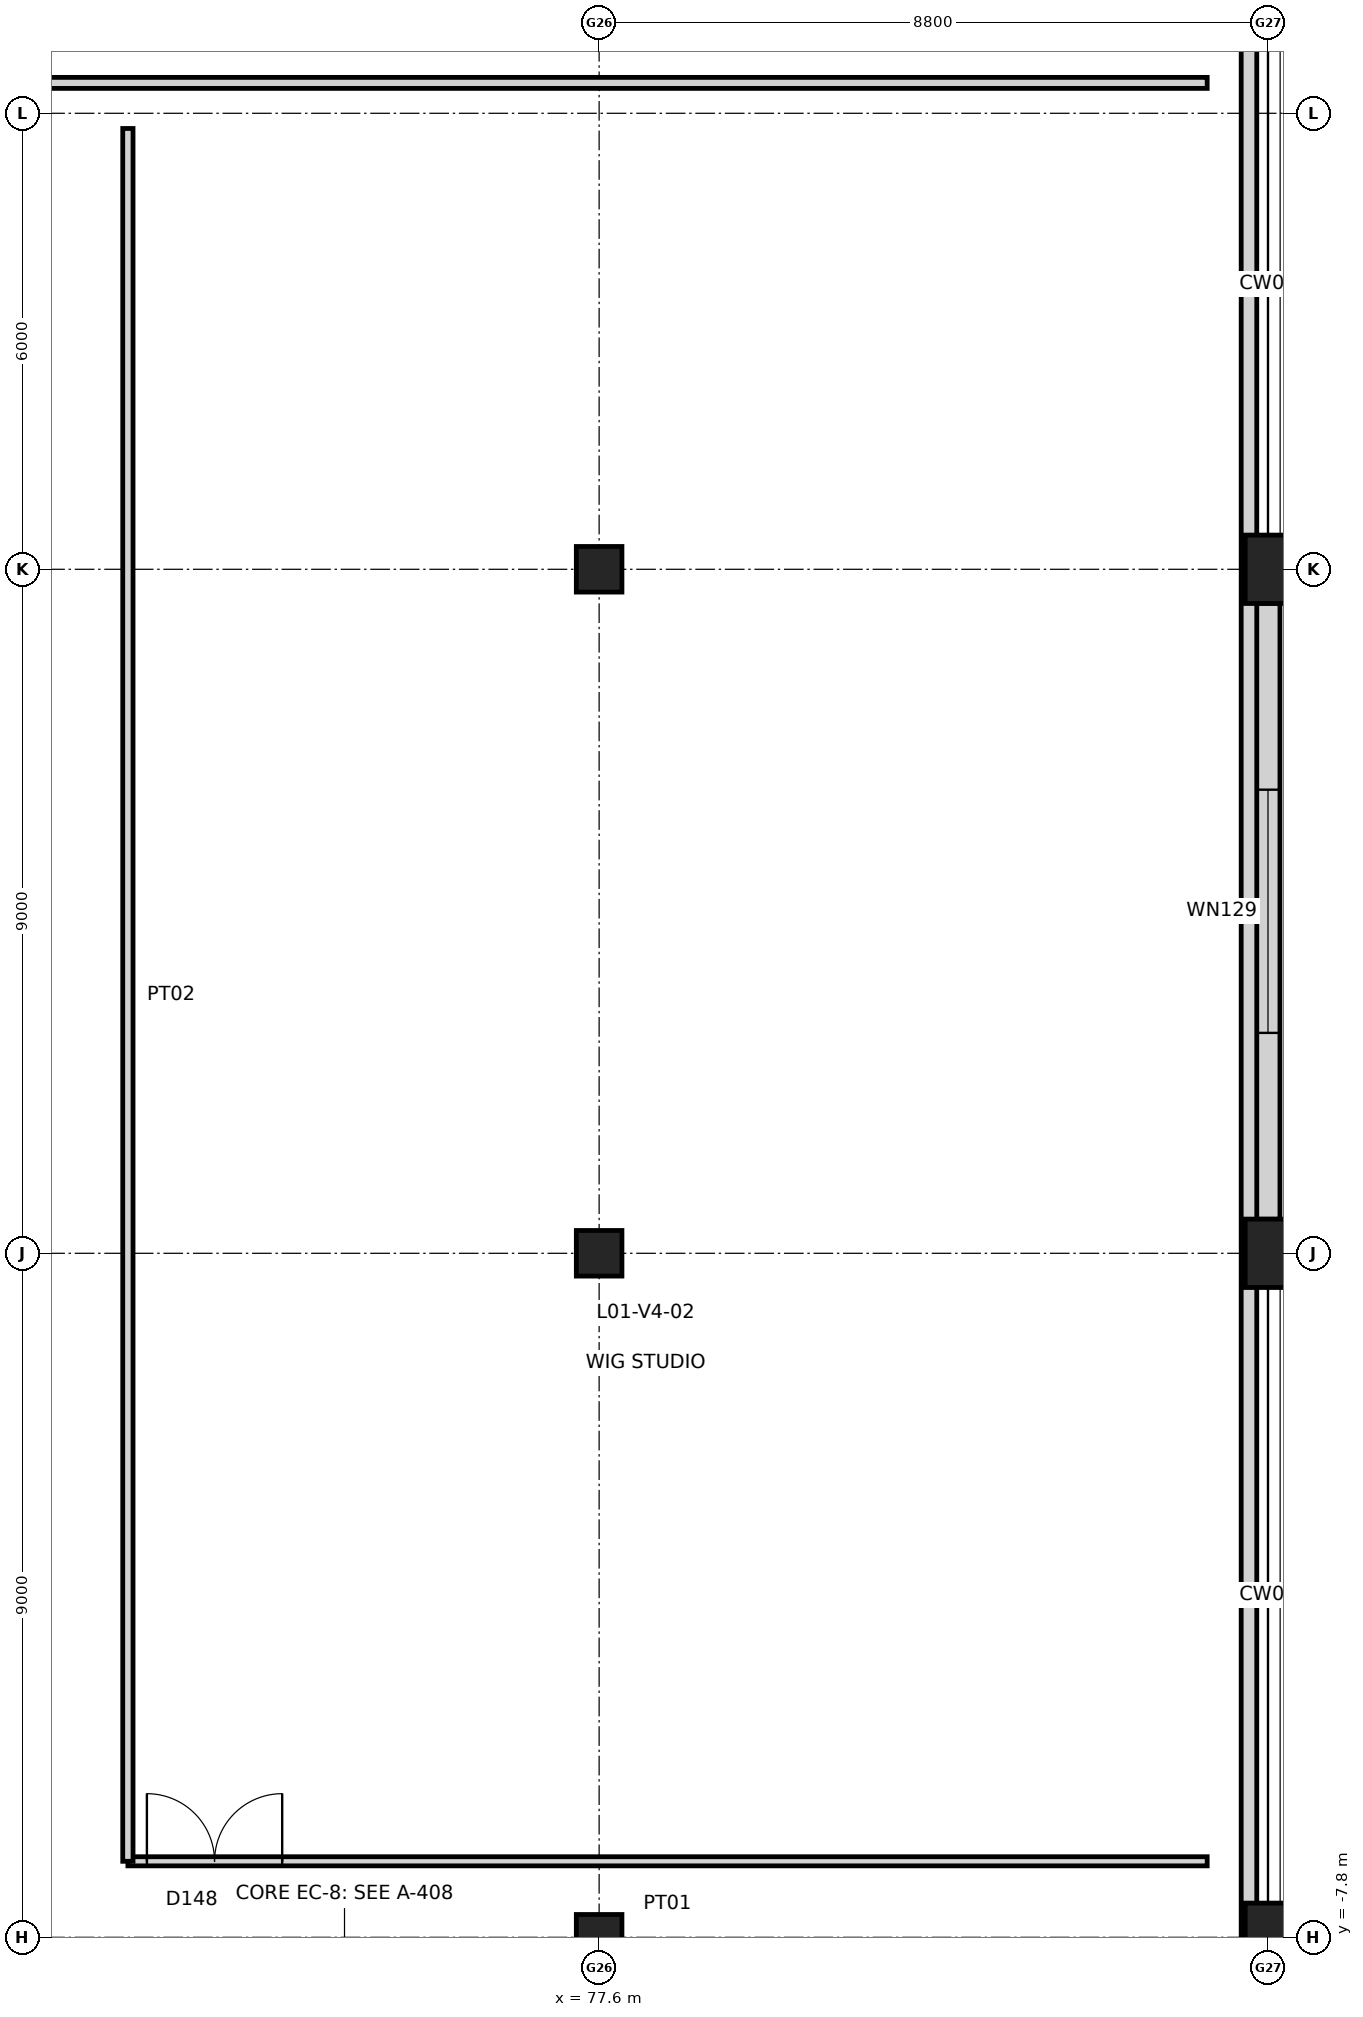
"""IFC4 building model, lengths in metres.
Left out: names, types, materials, properties, quantities, classifications, styles, units other than length and angle.
Written with IfcOpenShell. Run it as: python <this file> out.ifc"""

import sys

from ifc_helpers import new_model, si_unit, direction, frame, frame_2d, origin, origin_2d, place, context, subcontext, project, spatial, rectangle, extrude, element, fill, save


model = new_model("IFC4")
c1 = context("Model", 3, precision=1e-05, world=origin(), true_north=direction((0.0, 1.0)))
c2 = subcontext(c1, "Body", "Model", "MODEL_VIEW")
j1 = project(units=[si_unit("LENGTHUNIT", "METRE"), si_unit("PLANEANGLEUNIT", "RADIAN")], contexts=[c1])
p1 = place(None, origin())
s1 = spatial("IfcSite", under=j1, at=p1, CompositionType="ELEMENT")
p2 = place(p1, origin())
s2 = spatial("IfcBuilding", under=s1, at=p2, CompositionType="ELEMENT")
p3 = place(p2, frame((0.0, 0.0, 5.4)))
s3 = spatial("IfcBuildingStorey", under=s2, at=p3, CompositionType="ELEMENT", Elevation=5.4)
for number, where, z_axis, x_axis in (
    (1, (77.6, -7.8, 0.0), (0.0, 0.0, 1.0), (1.0, 0.0, 0.0)),
    (2, (77.6, 1.2, 0.0), (0.0, 0.0, 1.0), (1.0, 0.0, 0.0)),
    (3, (77.6, 10.2, 0.0), (0.0, 0.0, 1.0), (1.0, 0.0, 0.0)),
):
    element("IfcColumn", number, at=place(p3, frame(where, z_axis=z_axis, x_axis=x_axis)), inside=s3, PredefinedType="COLUMN", context=c2, shape_type="SweptSolid", body=[
        extrude(rectangle(XDim=0.6, YDim=0.6, at=origin_2d()), origin(), (0.0, 0.0, 1.0), 4.8),
    ])
for number, where, z_axis, x_axis in (
    (4, (86.4, -7.8, 0.0), (0.0, 0.0, 1.0), (1.0, 0.0, 0.0)),
    (5, (86.4, 1.2, 0.0), (0.0, 0.0, 1.0), (1.0, 0.0, 0.0)),
    (6, (86.4, 10.2, 0.0), (0.0, 0.0, 1.0), (1.0, 0.0, 0.0)),
):
    element("IfcColumn", number, at=place(p3, frame(where, z_axis=z_axis, x_axis=x_axis)), inside=s3, PredefinedType="COLUMN", context=c2, shape_type="SweptSolid", body=[
        extrude(rectangle(XDim=0.6, YDim=0.9, at=origin_2d()), origin(), (0.0, 0.0, 1.0), 4.8),
    ])
p4 = place(p3, frame((86.4, 9.752, 0.0), z_axis=(0.0, 0.0, 1.0), x_axis=(0.0, -1.0, 0.0)))
e7 = element("IfcWall", 7, at=p4, inside=s3, PredefinedType="STANDARD", context=c2, shape_type="SweptSolid", body=[
    extrude(rectangle(XDim=8.104, YDim=0.315, at=frame_2d((4.052, 0.0))), origin(), (0.0, 0.0, 1.0), 3.829),
])
p5 = place(p4, frame((2.452, 0.0, 0.85)))
e8 = element("IfcOpeningElement", 8, at=p5, cuts=e7, PredefinedType="OPENING", context=c2, shape_type="SweptSolid", body=[
    extrude(rectangle(XDim=3.2, YDim=1.45, at=frame_2d((1.6, 0.725))), frame((0.0, 0.167, 0.0), z_axis=(0.0, -1.0, 0.0), x_axis=(1.0, 0.0, 0.0)), (0.0, 0.0, 1.0), 0.335),
])
p6 = place(p3, frame((86.15, -37.35, 4.8), z_axis=(0.0, 0.0, 1.0), x_axis=(0.0, 1.0, 0.0)))
e9 = element("IfcWall", 9, at=p6, inside=s3, PredefinedType="PARAPET", context=c2, shape_type="SweptSolid", body=[
    extrude(rectangle(XDim=70.5, YDim=0.205, at=frame_2d((35.25, 0.0))), origin(), (0.0, 0.0, 1.0), 1.15),
])
p7 = place(p3, frame((52.0, 16.6, 0.0), z_axis=(0.0, 0.0, 1.0), x_axis=(1.0, 0.0, 0.0)))
e10 = element("IfcWall", 10, at=p7, inside=s3, PredefinedType="PARTITIONING", context=c2, shape_type="SweptSolid", body=[
    extrude(rectangle(XDim=33.6, YDim=0.145, at=frame_2d((16.8, 0.0))), origin(), (0.0, 0.0, 1.0), 4.42),
])
p8 = place(p3, frame((71.4, -6.8, 0.0), z_axis=(0.0, 0.0, 1.0), x_axis=(1.0, 0.0, 0.0)))
e11 = element("IfcWall", 11, at=p8, inside=s3, PredefinedType="PARTITIONING", context=c2, shape_type="SweptSolid", body=[
    extrude(rectangle(XDim=14.2, YDim=0.12, at=frame_2d((7.1, 0.0))), origin(), (0.0, 0.0, 1.0), 4.42),
])
p9 = place(p8, frame((0.25, 0.0, 0.0)))
e12 = element("IfcOpeningElement", 12, at=p9, cuts=e11, PredefinedType="OPENING", context=c2, shape_type="SweptSolid", body=[
    extrude(rectangle(XDim=1.78, YDim=2.3, at=frame_2d((0.89, 1.15))), frame((0.0, 0.07, 0.0), z_axis=(0.0, -1.0, 0.0), x_axis=(1.0, 0.0, 0.0)), (0.0, 0.0, 1.0), 0.14),
])
p10 = place(p3, frame((71.4, -6.8, 0.0), z_axis=(0.0, 0.0, 1.0), x_axis=(0.0, 1.0, 0.0)))
e13 = element("IfcWall", 13, at=p10, inside=s3, PredefinedType="PARTITIONING", context=c2, shape_type="SweptSolid", body=[
    extrude(rectangle(XDim=22.8, YDim=0.135, at=frame_2d((11.4, 0.0))), origin(), (0.0, 0.0, 1.0), 4.42),
])
p11 = place(p5, origin())
e14 = element("IfcWindow", 14, at=p11, inside=s3, PartitioningType="SINGLE_PANEL", PredefinedType="WINDOW", context=c2, shape_type="SweptSolid", body=[
    extrude(rectangle(XDim=3.2, YDim=1.45, at=frame_2d((1.6, 0.725))), frame((0.0, 0.03, 0.0), z_axis=(0.0, -1.0, 0.0), x_axis=(1.0, 0.0, 0.0)), (0.0, 0.0, 1.0), 0.06),
])
fill(e8, e14)
p12 = place(p2, frame((0.0, 0.0, 41.4)))
p13 = place(p12, frame((0.0, 0.0, -31.475)))
p14 = place(p13, frame((80.533, -2.1, 0.0)))
p15 = place(p14, frame((0.0, 0.0, 0.225)))
e15 = element("IfcWindow", 15, at=p15, inside=s3, PartitioningType="SINGLE_PANEL", PredefinedType="SKYLIGHT", context=c2, shape_type="SweptSolid", body=[
    extrude(rectangle(XDim=2.2, YDim=1.8, at=origin_2d()), origin(), (0.0, 0.0, 1.0), 0.05),
])
p16 = place(p13, frame((83.467, -2.1, 0.0)))
p17 = place(p16, frame((0.0, 0.0, 0.225)))
e16 = element("IfcWindow", 16, at=p17, inside=s3, PartitioningType="SINGLE_PANEL", PredefinedType="SKYLIGHT", context=c2, shape_type="SweptSolid", body=[
    extrude(rectangle(XDim=2.4, YDim=2.4, at=origin_2d()), origin(), (0.0, 0.0, 1.0), 0.05),
])
p18 = place(p9, origin())
e17 = element("IfcDoor", 17, at=p18, inside=s3, OperationType="DOUBLE_DOOR_SINGLE_SWING", PredefinedType="DOOR", context=c2, shape_type="SweptSolid", body=[
    extrude(rectangle(XDim=1.78, YDim=2.3, at=frame_2d((0.89, 1.15))), frame((0.0, 0.025, 0.0), z_axis=(0.0, -1.0, 0.0), x_axis=(1.0, 0.0, 0.0)), (0.0, 0.0, 1.0), 0.05),
])
fill(e12, e17)
save(model, sys.argv[1])
